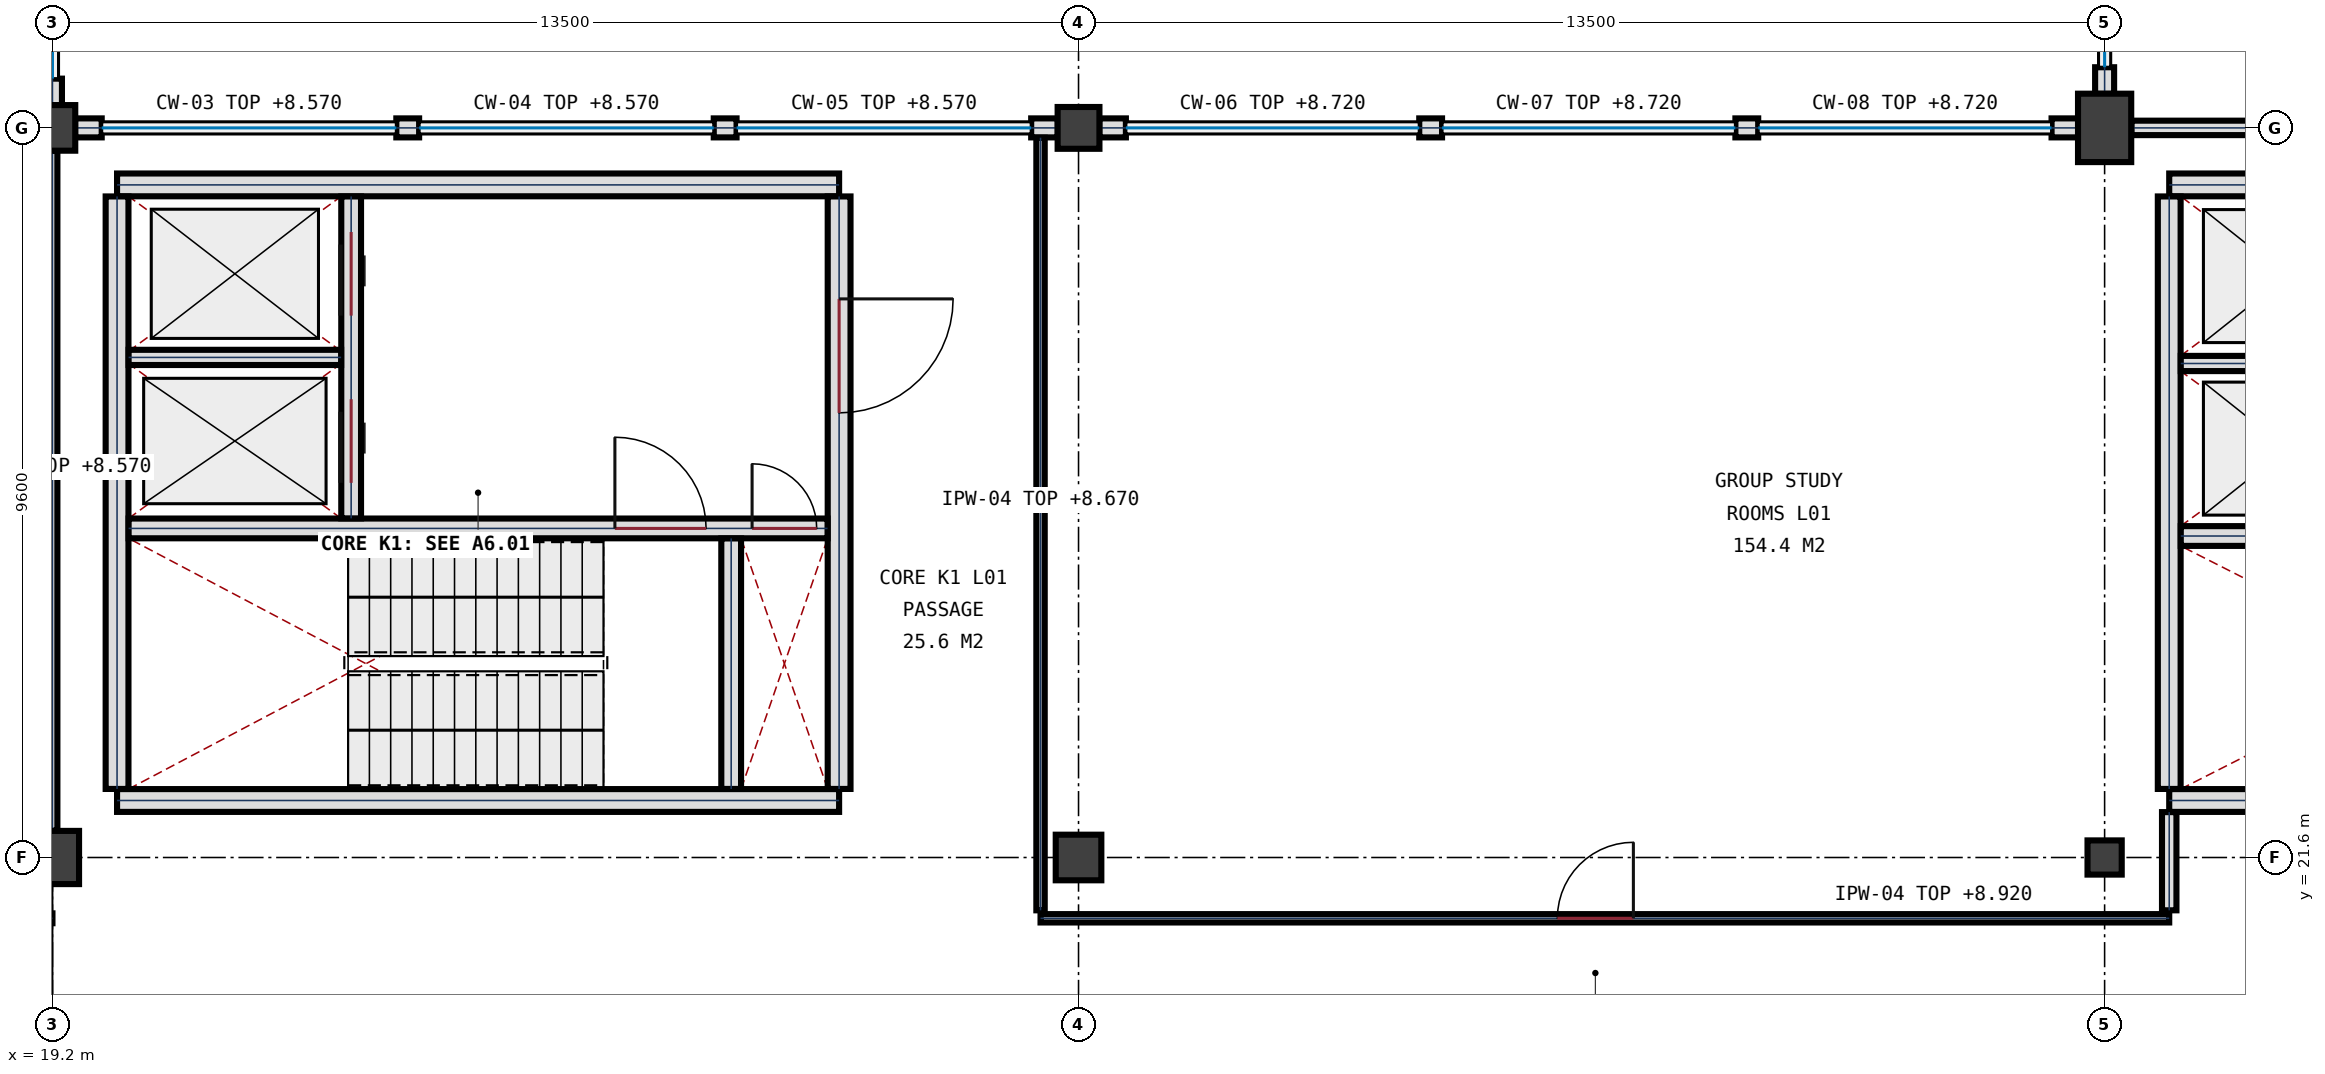
"""IFC4 building model, lengths in metres.
Left out: names, types, materials, properties, quantities, classifications, styles, units other than length and angle.
Written with IfcOpenShell. Run it as: python <this file> out.ifc"""

import sys

from ifc_helpers import new_model, si_unit, direction, frame, frame_2d, origin, origin_2d, place, context, subcontext, project, spatial, rectangle, circle, extrude, element, fill, save


model = new_model("IFC4")
c1 = context("Model", 3, precision=1e-05, world=origin(), true_north=direction((0.0, 1.0)))
c2 = subcontext(c1, "Body", "Model", "MODEL_VIEW")
j1 = project(units=[si_unit("LENGTHUNIT", "METRE"), si_unit("PLANEANGLEUNIT", "RADIAN")], contexts=[c1])
p1 = place(None, origin())
s1 = spatial("IfcSite", under=j1, at=p1, CompositionType="ELEMENT")
p2 = place(p1, origin())
s2 = spatial("IfcBuilding", under=s1, at=p2, CompositionType="ELEMENT")
p3 = place(p2, frame((0.0, 0.0, 5.4)))
s3 = spatial("IfcBuildingStorey", under=s2, at=p3, CompositionType="ELEMENT", Elevation=5.4)
p4 = place(p3, frame((19.2, 21.6, 0.0), z_axis=(0.0, 0.0, 1.0), x_axis=(1.0, 0.0, 0.0)))
e1 = element("IfcColumn", 1, at=p4, inside=s3, PredefinedType="COLUMN", context=c2, shape_type="SweptSolid", body=[
    extrude(circle(Radius=0.35, at=origin_2d()), origin(), (0.0, 0.0, 1.0), 4.5),
])
p5 = place(p3, frame((19.2, 31.2, 0.0), z_axis=(0.0, 0.0, 1.0), x_axis=(1.0, 0.0, 0.0)))
e2 = element("IfcColumn", 2, at=p5, inside=s3, PredefinedType="COLUMN", context=c2, shape_type="SweptSolid", body=[
    extrude(circle(Radius=0.3, at=origin_2d()), origin(), (0.0, 0.0, 1.0), 4.5),
])
p6 = place(p3, frame((32.7, 21.6, 0.0), z_axis=(0.0, 0.0, 1.0), x_axis=(1.0, 0.0, 0.0)))
e3 = element("IfcColumn", 3, at=p6, inside=s3, PredefinedType="COLUMN", context=c2, shape_type="SweptSolid", body=[
    extrude(rectangle(XDim=0.6, YDim=0.6, at=origin_2d()), origin(), (0.0, 0.0, 1.0), 4.5),
])
p7 = place(p3, frame((32.7, 31.2, 0.0), z_axis=(0.0, 0.0, 1.0), x_axis=(1.0, 0.0, 0.0)))
e4 = element("IfcColumn", 4, at=p7, inside=s3, PredefinedType="COLUMN", context=c2, shape_type="SweptSolid", body=[
    extrude(rectangle(XDim=0.55, YDim=0.55, at=origin_2d()), origin(), (0.0, 0.0, 1.0), 4.5),
])
p8 = place(p3, frame((46.2, 21.6, 0.0), z_axis=(0.0, 0.0, 1.0), x_axis=(1.0, 0.0, 0.0)))
e5 = element("IfcColumn", 5, at=p8, inside=s3, PredefinedType="COLUMN", context=c2, shape_type="SweptSolid", body=[
    extrude(rectangle(XDim=0.45, YDim=0.45, at=origin_2d()), origin(), (0.0, 0.0, 1.0), 4.5),
])
p9 = place(p3, frame((46.2, 31.2, 0.0), z_axis=(0.0, 0.0, 1.0), x_axis=(0.0, 1.0, 0.0)))
e6 = element("IfcColumn", 6, at=p9, inside=s3, PredefinedType="COLUMN", context=c2, shape_type="SweptSolid", body=[
    extrude(rectangle(XDim=0.9, YDim=0.7, at=origin_2d()), origin(), (0.0, 0.0, 1.0), 4.5),
])
for number, where, z_axis, x_axis in (
    (7, (19.2, 31.848, 0.0), (0.0, 0.0, 1.0), (0.0, -1.0, 0.0)),
    (8, (19.498, 31.2, 0.0), (0.0, 0.0, 1.0), (1.0, 0.0, 0.0)),
):
    element("IfcWall", number, at=place(p3, frame(where, z_axis=z_axis, x_axis=x_axis)), inside=s3, PredefinedType="SOLIDWALL", context=c2, shape_type="SweptSolid", body=[
        extrude(rectangle(XDim=0.35, YDim=0.25, at=frame_2d((0.175, 0.0))), origin(), (0.0, 0.0, 1.0), 3.17),
    ])
p10 = place(p3, frame((32.077, 31.2, 0.0), z_axis=(0.0, 0.0, 1.0), x_axis=(1.0, 0.0, 0.0)))
e9 = element("IfcWall", 9, at=p10, inside=s3, PredefinedType="SOLIDWALL", context=c2, shape_type="SweptSolid", body=[
    extrude(rectangle(XDim=0.35, YDim=0.25, at=frame_2d((0.175, 0.0))), origin(), (0.0, 0.0, 1.0), 3.17),
])
for number, where, z_axis, x_axis in (
    (10, (23.724, 31.2, 0.0), (0.0, 0.0, 1.0), (1.0, 0.0, 0.0)),
    (11, (27.901, 31.2, 0.0), (0.0, 0.0, 1.0), (1.0, 0.0, 0.0)),
):
    element("IfcWall", number, at=place(p3, frame(where, z_axis=z_axis, x_axis=x_axis)), inside=s3, PredefinedType="SOLIDWALL", context=c2, shape_type="SweptSolid", body=[
        extrude(rectangle(XDim=0.3, YDim=0.25, at=frame_2d((0.15, 0.0))), origin(), (0.0, 0.0, 1.0), 3.17),
    ])
for number, where, z_axis, x_axis in (
    (12, (32.973, 31.2, 0.0), (0.0, 0.0, 1.0), (1.0, 0.0, 0.0)),
    (13, (45.502, 31.2, 0.0), (0.0, 0.0, 1.0), (1.0, 0.0, 0.0)),
):
    element("IfcWall", number, at=place(p3, frame(where, z_axis=z_axis, x_axis=x_axis)), inside=s3, PredefinedType="SOLIDWALL", context=c2, shape_type="SweptSolid", body=[
        extrude(rectangle(XDim=0.35, YDim=0.25, at=frame_2d((0.175, 0.0))), origin(), (0.0, 0.0, 1.0), 3.32),
    ])
for number, where, z_axis, x_axis in (
    (14, (37.183, 31.2, 0.0), (0.0, 0.0, 1.0), (1.0, 0.0, 0.0)),
    (15, (41.342, 31.2, 0.0), (0.0, 0.0, 1.0), (1.0, 0.0, 0.0)),
):
    element("IfcWall", number, at=place(p3, frame(where, z_axis=z_axis, x_axis=x_axis)), inside=s3, PredefinedType="SOLIDWALL", context=c2, shape_type="SweptSolid", body=[
        extrude(rectangle(XDim=0.3, YDim=0.25, at=frame_2d((0.15, 0.0))), origin(), (0.0, 0.0, 1.0), 3.32),
    ])
p11 = place(p3, frame((46.2, 31.648, 0.0), z_axis=(0.0, 0.0, 1.0), x_axis=(0.0, 1.0, 0.0)))
e16 = element("IfcWall", 16, at=p11, inside=s3, PredefinedType="SOLIDWALL", context=c2, shape_type="SweptSolid", body=[
    extrude(rectangle(XDim=0.35, YDim=0.25, at=frame_2d((0.175, 0.0))), origin(), (0.0, 0.0, 1.0), 3.42),
])
for number, where, z_axis, x_axis in (
    (17, (29.55, 22.35, 0.0), (0.0, 0.0, 1.0), (-1.0, 0.0, 0.0)),
    (18, (20.05, 30.45, 0.0), (0.0, 0.0, 1.0), (1.0, 0.0, 0.0)),
):
    element("IfcWall", number, at=place(p3, frame(where, z_axis=z_axis, x_axis=x_axis)), inside=s3, PredefinedType="SHEAR", context=c2, shape_type="SweptSolid", body=[
        extrude(rectangle(XDim=9.5, YDim=0.3, at=frame_2d((4.75, 0.0))), origin(), (0.0, 0.0, 1.0), 4.5),
    ])
p12 = place(p3, frame((20.05, 22.502, 0.0), z_axis=(0.0, 0.0, 1.0), x_axis=(0.0, 1.0, 0.0)))
e19 = element("IfcWall", 19, at=p12, inside=s3, PredefinedType="SHEAR", context=c2, shape_type="SweptSolid", body=[
    extrude(rectangle(XDim=7.796, YDim=0.3, at=frame_2d((3.898, 0.0))), origin(), (0.0, 0.0, 1.0), 4.5),
])
p13 = place(p3, frame((29.55, 30.298, 0.0), z_axis=(0.0, 0.0, 1.0), x_axis=(0.0, -1.0, 0.0)))
e20 = element("IfcWall", 20, at=p13, inside=s3, PredefinedType="SHEAR", context=c2, shape_type="SweptSolid", body=[
    extrude(rectangle(XDim=7.796, YDim=0.3, at=frame_2d((3.898, 0.0))), origin(), (0.0, 0.0, 1.0), 4.5),
])
p14 = place(p13, frame((1.348, 0.0, 0.0)))
e21 = element("IfcOpeningElement", 21, at=p14, cuts=e20, PredefinedType="OPENING", context=c2, shape_type="SweptSolid", body=[
    extrude(rectangle(XDim=1.5, YDim=2.25, at=frame_2d((0.75, 1.125))), frame((0.0, 0.16, 0.0), z_axis=(0.0, -1.0, 0.0), x_axis=(1.0, 0.0, 0.0)), (0.0, 0.0, 1.0), 0.32),
])
p15 = place(p3, frame((20.202, 25.93, 0.0), z_axis=(0.0, 0.0, 1.0), x_axis=(1.0, 0.0, 0.0)))
e22 = element("IfcWall", 22, at=p15, inside=s3, PredefinedType="SHEAR", context=c2, shape_type="SweptSolid", body=[
    extrude(rectangle(XDim=9.196, YDim=0.26, at=frame_2d((4.598, 0.0))), origin(), (0.0, 0.0, 1.0), 4.5),
])
p16 = place(p15, frame((6.398, 0.0, 0.0)))
e23 = element("IfcOpeningElement", 23, at=p16, cuts=e22, PredefinedType="OPENING", context=c2, shape_type="SweptSolid", body=[
    extrude(rectangle(XDim=1.2, YDim=2.2, at=frame_2d((0.6, 1.1))), frame((0.0, 0.14, 0.0), z_axis=(0.0, -1.0, 0.0), x_axis=(1.0, 0.0, 0.0)), (0.0, 0.0, 1.0), 0.28),
])
p17 = place(p15, frame((8.203, 0.0, 0.0)))
e24 = element("IfcOpeningElement", 24, at=p17, cuts=e22, PredefinedType="OPENING", context=c2, shape_type="SweptSolid", body=[
    extrude(rectangle(XDim=0.85, YDim=2.05, at=frame_2d((0.425, 1.025))), frame((0.0, 0.14, 0.0), z_axis=(0.0, -1.0, 0.0), x_axis=(1.0, 0.0, 0.0)), (0.0, 0.0, 1.0), 0.28),
])
p18 = place(p3, frame((28.13, 22.502, 0.0), z_axis=(0.0, 0.0, 1.0), x_axis=(0.0, 1.0, 0.0)))
e25 = element("IfcWall", 25, at=p18, inside=s3, PredefinedType="SHEAR", context=c2, shape_type="SweptSolid", body=[
    extrude(rectangle(XDim=3.296, YDim=0.26, at=frame_2d((1.648, 0.0))), origin(), (0.0, 0.0, 1.0), 4.5),
])
p19 = place(p3, frame((23.13, 26.062, 0.0), z_axis=(0.0, 0.0, 1.0), x_axis=(0.0, 1.0, 0.0)))
e26 = element("IfcWall", 26, at=p19, inside=s3, PredefinedType="SHEAR", context=c2, shape_type="SweptSolid", body=[
    extrude(rectangle(XDim=4.236, YDim=0.26, at=frame_2d((2.118, 0.0))), origin(), (0.0, 0.0, 1.0), 4.5),
])
p20 = place(p19, frame((0.468, 0.0, 0.0)))
e27 = element("IfcOpeningElement", 27, at=p20, cuts=e26, PredefinedType="OPENING", context=c2, shape_type="SweptSolid", body=[
    extrude(rectangle(XDim=1.1, YDim=2.15, at=frame_2d((0.55, 1.075))), frame((0.0, 0.14, 0.0), z_axis=(0.0, -1.0, 0.0), x_axis=(1.0, 0.0, 0.0)), (0.0, 0.0, 1.0), 0.28),
])
p21 = place(p19, frame((2.668, 0.0, 0.0)))
e28 = element("IfcOpeningElement", 28, at=p21, cuts=e26, PredefinedType="OPENING", context=c2, shape_type="SweptSolid", body=[
    extrude(rectangle(XDim=1.1, YDim=2.15, at=frame_2d((0.55, 1.075))), frame((0.0, 0.14, 0.0), z_axis=(0.0, -1.0, 0.0), x_axis=(1.0, 0.0, 0.0)), (0.0, 0.0, 1.0), 0.28),
])
p22 = place(p3, frame((20.202, 28.18, 0.0), z_axis=(0.0, 0.0, 1.0), x_axis=(1.0, 0.0, 0.0)))
e29 = element("IfcWall", 29, at=p22, inside=s3, PredefinedType="PLUMBINGWALL", context=c2, shape_type="SweptSolid", body=[
    extrude(rectangle(XDim=2.796, YDim=0.2, at=frame_2d((1.398, 0.0))), origin(), (0.0, 0.0, 1.0), 4.18),
])
for number, where, z_axis, x_axis in (
    (30, (56.55, 22.35, 0.0), (0.0, 0.0, 1.0), (-1.0, 0.0, 0.0)),
    (31, (47.05, 30.45, 0.0), (0.0, 0.0, 1.0), (1.0, 0.0, 0.0)),
):
    element("IfcWall", number, at=place(p3, frame(where, z_axis=z_axis, x_axis=x_axis)), inside=s3, PredefinedType="SHEAR", context=c2, shape_type="SweptSolid", body=[
        extrude(rectangle(XDim=9.5, YDim=0.3, at=frame_2d((4.75, 0.0))), origin(), (0.0, 0.0, 1.0), 4.5),
    ])
p23 = place(p3, frame((47.05, 22.502, 0.0), z_axis=(0.0, 0.0, 1.0), x_axis=(0.0, 1.0, 0.0)))
e32 = element("IfcWall", 32, at=p23, inside=s3, PredefinedType="SHEAR", context=c2, shape_type="SweptSolid", body=[
    extrude(rectangle(XDim=7.796, YDim=0.3, at=frame_2d((3.898, 0.0))), origin(), (0.0, 0.0, 1.0), 4.5),
])
p24 = place(p3, frame((47.202, 25.83, 0.0), z_axis=(0.0, 0.0, 1.0), x_axis=(1.0, 0.0, 0.0)))
e33 = element("IfcWall", 33, at=p24, inside=s3, PredefinedType="SHEAR", context=c2, shape_type="SweptSolid", body=[
    extrude(rectangle(XDim=9.196, YDim=0.26, at=frame_2d((4.598, 0.0))), origin(), (0.0, 0.0, 1.0), 4.5),
])
p25 = place(p24, frame((6.398, 0.0, 0.0)))
e34 = element("IfcOpeningElement", 34, at=p25, cuts=e33, PredefinedType="OPENING", context=c2, shape_type="SweptSolid", body=[
    extrude(rectangle(XDim=1.2, YDim=2.2, at=frame_2d((0.6, 1.1))), frame((0.0, 0.14, 0.0), z_axis=(0.0, -1.0, 0.0), x_axis=(1.0, 0.0, 0.0)), (0.0, 0.0, 1.0), 0.28),
])
p26 = place(p24, frame((8.203, 0.0, 0.0)))
e35 = element("IfcOpeningElement", 35, at=p26, cuts=e33, PredefinedType="OPENING", context=c2, shape_type="SweptSolid", body=[
    extrude(rectangle(XDim=0.85, YDim=2.05, at=frame_2d((0.425, 1.025))), frame((0.0, 0.14, 0.0), z_axis=(0.0, -1.0, 0.0), x_axis=(1.0, 0.0, 0.0)), (0.0, 0.0, 1.0), 0.28),
])
p27 = place(p3, frame((47.202, 28.1, 0.0), z_axis=(0.0, 0.0, 1.0), x_axis=(1.0, 0.0, 0.0)))
e36 = element("IfcWall", 36, at=p27, inside=s3, PredefinedType="PLUMBINGWALL", context=c2, shape_type="SweptSolid", body=[
    extrude(rectangle(XDim=2.796, YDim=0.2, at=frame_2d((1.398, 0.0))), origin(), (0.0, 0.0, 1.0), 4.18),
])
p28 = place(p3, frame((32.2, 20.8, 0.0), z_axis=(0.0, 0.0, 1.0), x_axis=(1.0, 0.0, 0.0)))
e37 = element("IfcWall", 37, at=p28, inside=s3, PredefinedType="PARTITIONING", context=c2, shape_type="SweptSolid", body=[
    extrude(rectangle(XDim=14.85, YDim=0.11, at=frame_2d((7.425, 0.0))), origin(), (0.0, 0.0, 1.0), 3.52),
])
p29 = place(p28, frame((6.8, 0.0, 0.0)))
e38 = element("IfcOpeningElement", 38, at=p29, cuts=e37, PredefinedType="OPENING", context=c2, shape_type="SweptSolid", body=[
    extrude(rectangle(XDim=1.0, YDim=2.2, at=frame_2d((0.5, 1.1))), frame((0.0, 0.065, 0.0), z_axis=(0.0, -1.0, 0.0), x_axis=(1.0, 0.0, 0.0)), (0.0, 0.0, 1.0), 0.13),
])
p30 = place(p3, frame((46.553, 31.2, 0.0), z_axis=(0.0, 0.0, 1.0), x_axis=(1.0, 0.0, 0.0)))
e39 = element("IfcWall", 39, at=p30, inside=s3, PredefinedType="PARTITIONING", context=c2, shape_type="SweptSolid", body=[
    extrude(rectangle(XDim=9.997, YDim=0.19, at=frame_2d((4.999, 0.0))), origin(), (0.0, 0.0, 1.0), 3.42),
])
p31 = place(p3, frame((19.2, 21.953, 0.0), z_axis=(0.0, 0.0, 1.0), x_axis=(0.0, 1.0, 0.0)))
e40 = element("IfcWall", 40, at=p31, inside=s3, PredefinedType="PARTITIONING", context=c2, shape_type="SweptSolid", body=[
    extrude(rectangle(XDim=8.944, YDim=0.13, at=frame_2d((4.472, 0.0))), origin(), (0.0, 0.0, 1.0), 3.17),
])
p32 = place(p3, frame((32.2, 20.905, 0.0), z_axis=(0.0, 0.0, 1.0), x_axis=(0.0, 1.0, 0.0)))
e41 = element("IfcWall", 41, at=p32, inside=s3, PredefinedType="PARTITIONING", context=c2, shape_type="SweptSolid", body=[
    extrude(rectangle(XDim=10.166, YDim=0.11, at=frame_2d((5.083, 0.0))), origin(), (0.0, 0.0, 1.0), 3.27),
])
p33 = place(p3, frame((47.05, 20.905, 0.0), z_axis=(0.0, 0.0, 1.0), x_axis=(0.0, 1.0, 0.0)))
e42 = element("IfcWall", 42, at=p33, inside=s3, PredefinedType="PARTITIONING", context=c2, shape_type="SweptSolid", body=[
    extrude(rectangle(XDim=1.292, YDim=0.19, at=frame_2d((0.646, 0.0))), origin(), (0.0, 0.0, 1.0), 3.37),
])
p34 = place(p14, origin())
e43 = element("IfcDoor", 43, at=p34, inside=s3, OperationType="SINGLE_SWING_LEFT", PredefinedType="DOOR", context=c2, shape_type="SweptSolid", body=[
    extrude(rectangle(XDim=1.5, YDim=2.25, at=frame_2d((0.75, 1.125))), frame((0.0, 0.032, 0.0), z_axis=(0.0, -1.0, 0.0), x_axis=(1.0, 0.0, 0.0)), (0.0, 0.0, 1.0), 0.065),
])
fill(e21, e43)
p35 = place(p16, origin())
e44 = element("IfcDoor", 44, at=p35, inside=s3, OperationType="SINGLE_SWING_LEFT", PredefinedType="DOOR", context=c2, shape_type="SweptSolid", body=[
    extrude(rectangle(XDim=1.2, YDim=2.2, at=frame_2d((0.6, 1.1))), frame((0.0, 0.032, 0.0), z_axis=(0.0, -1.0, 0.0), x_axis=(1.0, 0.0, 0.0)), (0.0, 0.0, 1.0), 0.065),
])
fill(e23, e44)
p36 = place(p17, origin())
e45 = element("IfcDoor", 45, at=p36, inside=s3, OperationType="SINGLE_SWING_LEFT", PredefinedType="DOOR", context=c2, shape_type="SweptSolid", body=[
    extrude(rectangle(XDim=0.85, YDim=2.05, at=frame_2d((0.425, 1.025))), frame((0.0, 0.032, 0.0), z_axis=(0.0, -1.0, 0.0), x_axis=(1.0, 0.0, 0.0)), (0.0, 0.0, 1.0), 0.065),
])
fill(e24, e45)
p37 = place(p20, origin())
e46 = element("IfcDoor", 46, at=p37, inside=s3, OperationType="SLIDING_TO_LEFT", PredefinedType="DOOR", context=c2, shape_type="SweptSolid", body=[
    extrude(rectangle(XDim=1.1, YDim=2.15, at=frame_2d((0.55, 1.075))), frame((0.0, 0.032, 0.0), z_axis=(0.0, -1.0, 0.0), x_axis=(1.0, 0.0, 0.0)), (0.0, 0.0, 1.0), 0.065),
])
fill(e27, e46)
p38 = place(p21, origin())
e47 = element("IfcDoor", 47, at=p38, inside=s3, OperationType="SLIDING_TO_LEFT", PredefinedType="DOOR", context=c2, shape_type="SweptSolid", body=[
    extrude(rectangle(XDim=1.1, YDim=2.15, at=frame_2d((0.55, 1.075))), frame((0.0, 0.032, 0.0), z_axis=(0.0, -1.0, 0.0), x_axis=(1.0, 0.0, 0.0)), (0.0, 0.0, 1.0), 0.065),
])
fill(e28, e47)
p39 = place(p29, origin())
e48 = element("IfcDoor", 48, at=p39, inside=s3, OperationType="SINGLE_SWING_RIGHT", PredefinedType="DOOR", context=c2, shape_type="SweptSolid", body=[
    extrude(rectangle(XDim=1.0, YDim=2.2, at=frame_2d((0.5, 1.1))), frame((0.0, 0.032, 0.0), z_axis=(0.0, -1.0, 0.0), x_axis=(1.0, 0.0, 0.0)), (0.0, 0.0, 1.0), 0.065),
])
fill(e38, e48)
save(model, sys.argv[1])
